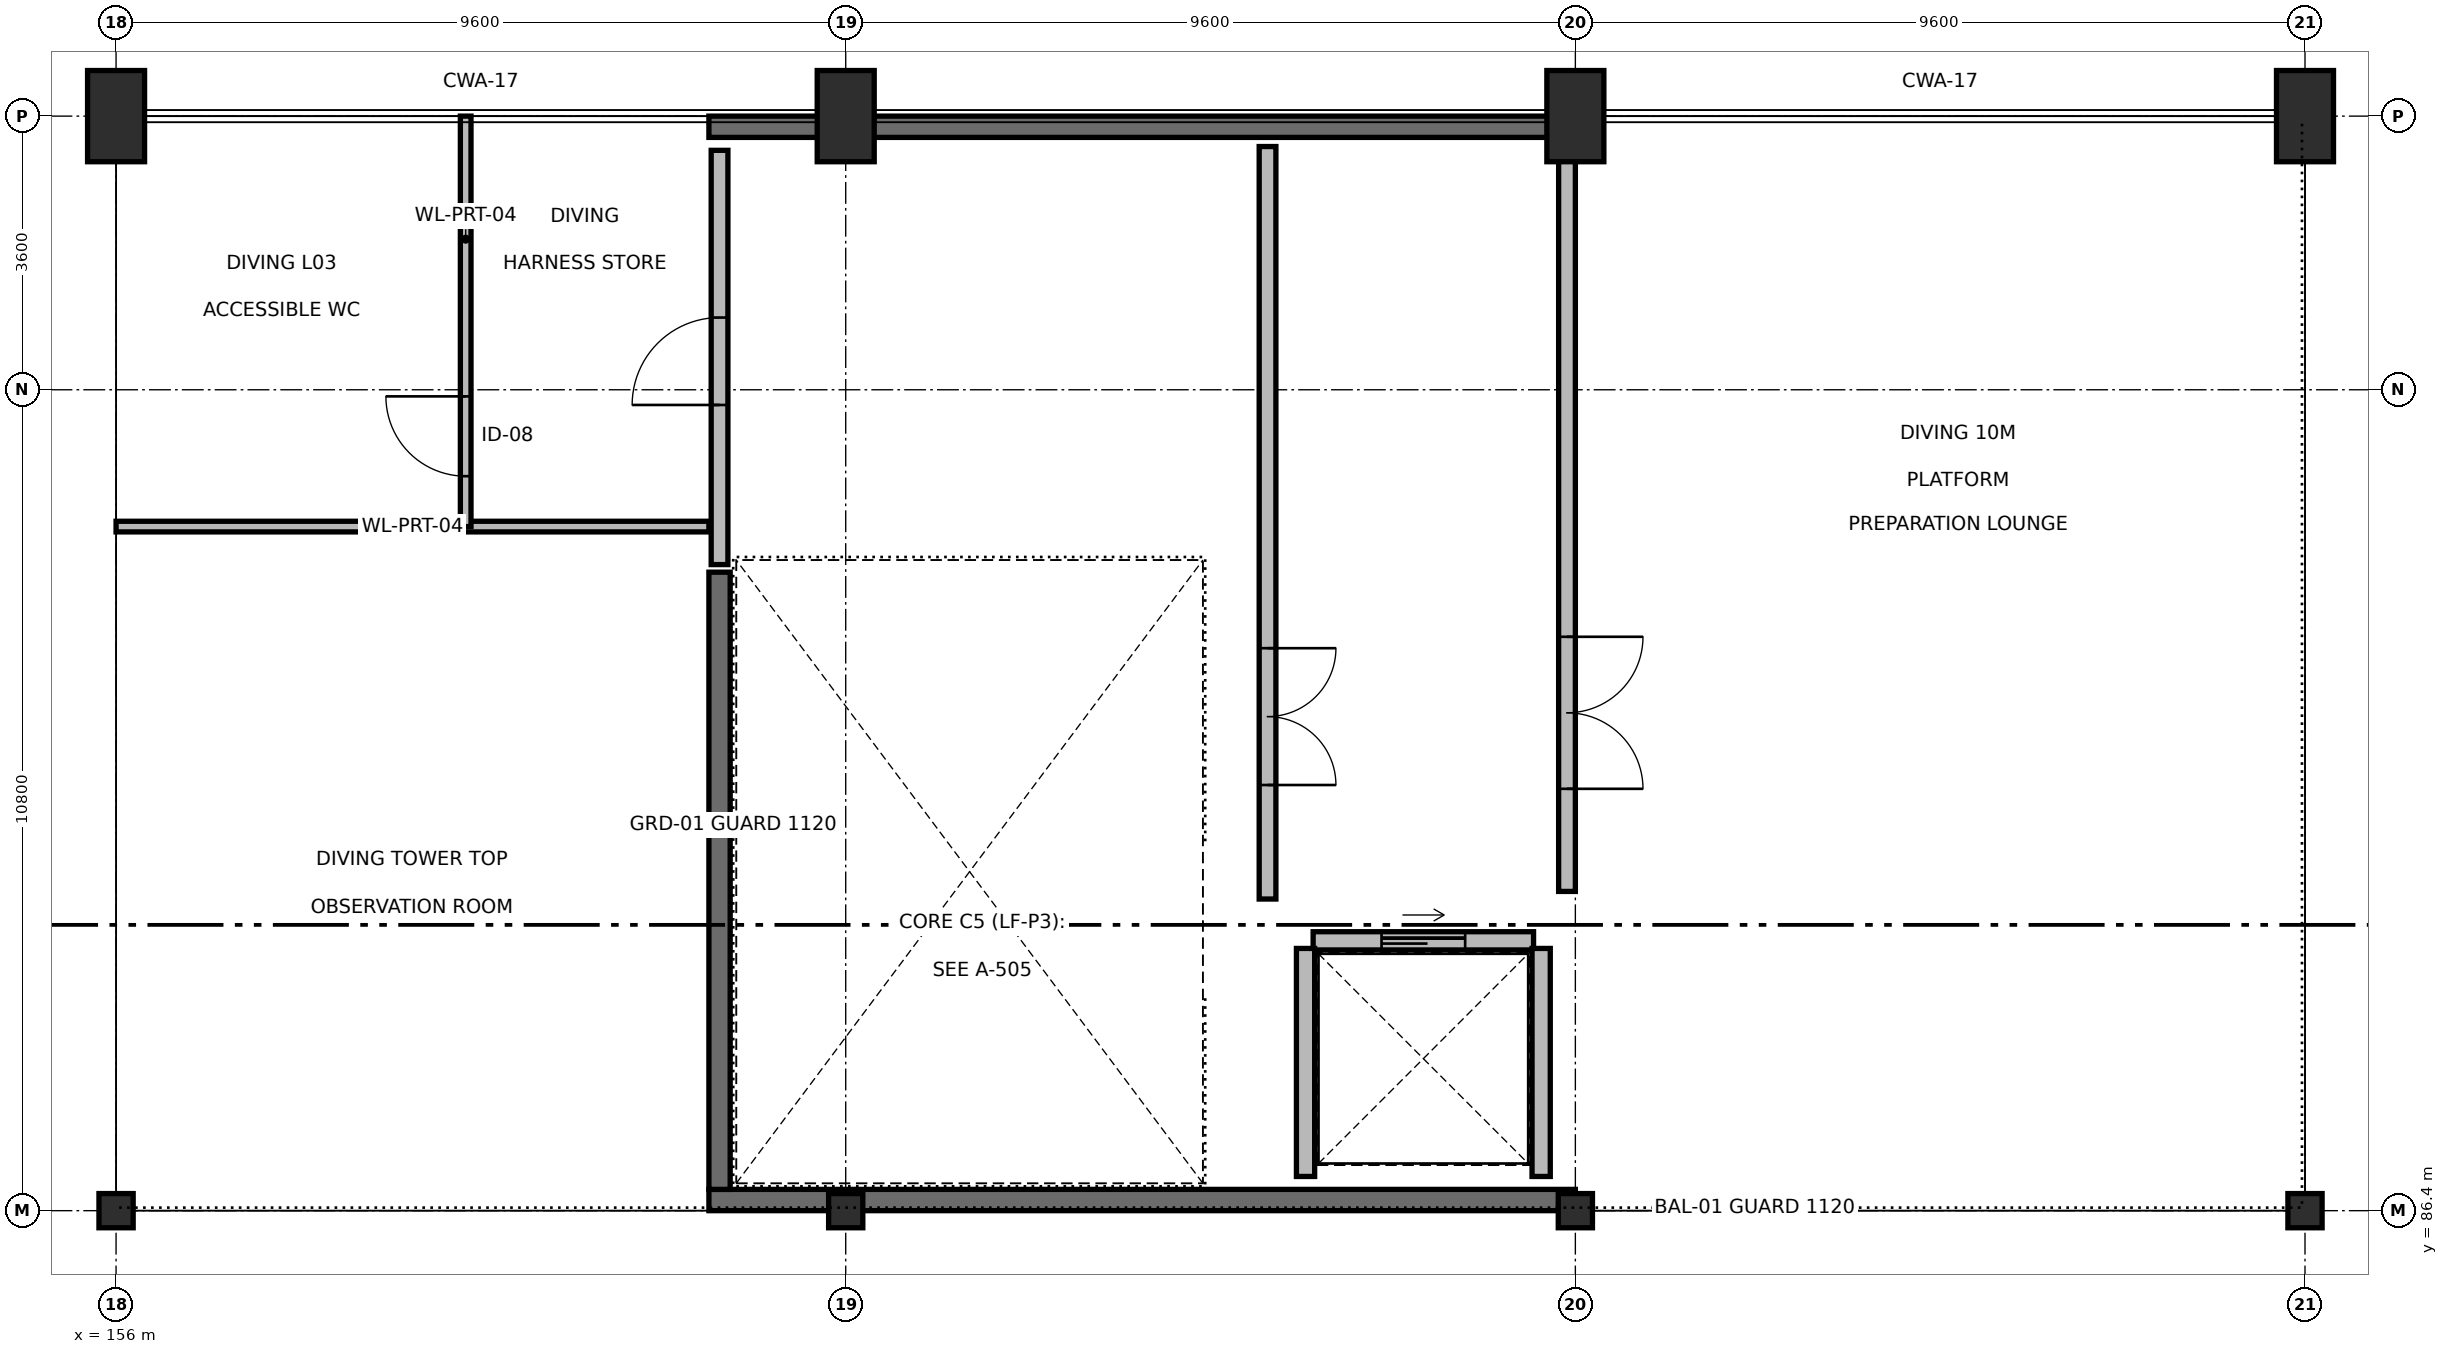
"""IFC4 building model, lengths in metres.
Left out: names, types, materials, properties, quantities, classifications, styles, units other than length and angle.
Written with IfcOpenShell. Run it as: python <this file> out.ifc"""

import sys

from ifc_helpers import new_model, si_unit, direction, frame, frame_2d, origin, origin_2d, place, context, subcontext, project, spatial, rectangle, extrude, element, fill, save


model = new_model("IFC4")
c1 = context("Model", 3, precision=1e-05, world=origin(), true_north=direction((0.0, 1.0)))
c2 = subcontext(c1, "Body", "Model", "MODEL_VIEW")
j1 = project(units=[si_unit("LENGTHUNIT", "METRE"), si_unit("PLANEANGLEUNIT", "RADIAN")], contexts=[c1])
p1 = place(None, origin())
s1 = spatial("IfcSite", under=j1, at=p1, CompositionType="ELEMENT")
p2 = place(p1, origin())
s2 = spatial("IfcBuilding", under=s1, at=p2, CompositionType="ELEMENT")
p3 = place(p2, frame((0.0, 0.0, 14.1)))
s3 = spatial("IfcBuildingStorey", under=s2, at=p3, CompositionType="ELEMENT", Elevation=14.1)
p4 = place(p3, frame((156.0, 100.8, 0.0), z_axis=(0.0, 0.0, 1.0), x_axis=(1.0, 0.0, 0.0)))
e1 = element("IfcColumn", 1, at=p4, inside=s3, PredefinedType="COLUMN", context=c2, shape_type="SweptSolid", body=[
    extrude(rectangle(XDim=0.75, YDim=1.2, at=origin_2d()), origin(), (0.0, 0.0, 1.0), 2.26),
])
p5 = place(p3, frame((165.6, 100.8, 0.0), z_axis=(0.0, 0.0, 1.0), x_axis=(1.0, 0.0, 0.0)))
e2 = element("IfcColumn", 2, at=p5, inside=s3, PredefinedType="COLUMN", context=c2, shape_type="SweptSolid", body=[
    extrude(rectangle(XDim=0.75, YDim=1.2, at=origin_2d()), origin(), (0.0, 0.0, 1.0), 2.56),
])
p6 = place(p3, frame((175.2, 100.8, 0.0), z_axis=(0.0, 0.0, 1.0), x_axis=(1.0, 0.0, 0.0)))
e3 = element("IfcColumn", 3, at=p6, inside=s3, PredefinedType="COLUMN", context=c2, shape_type="SweptSolid", body=[
    extrude(rectangle(XDim=0.75, YDim=1.2, at=origin_2d()), origin(), (0.0, 0.0, 1.0), 2.31),
])
p7 = place(p3, frame((184.8, 100.8, 0.0), z_axis=(0.0, 0.0, 1.0), x_axis=(1.0, 0.0, 0.0)))
e4 = element("IfcColumn", 4, at=p7, inside=s3, PredefinedType="COLUMN", context=c2, shape_type="SweptSolid", body=[
    extrude(rectangle(XDim=0.75, YDim=1.2, at=origin_2d()), origin(), (0.0, 0.0, 1.0), 2.56),
])
for number, where, z_axis, x_axis in (
    (5, (156.0, 86.4, 0.0), (0.0, 0.0, 1.0), (1.0, 0.0, 0.0)),
    (6, (165.6, 86.4, 0.0), (0.0, 0.0, 1.0), (1.0, 0.0, 0.0)),
    (7, (175.2, 86.4, 0.0), (0.0, 0.0, 1.0), (1.0, 0.0, 0.0)),
    (8, (184.8, 86.4, 0.0), (0.0, 0.0, 1.0), (1.0, 0.0, 0.0)),
):
    element("IfcColumn", number, at=place(p3, frame(where, z_axis=z_axis, x_axis=x_axis)), inside=s3, PredefinedType="COLUMN", context=c2, shape_type="SweptSolid", body=[
        extrude(rectangle(XDim=0.45, YDim=0.45, at=origin_2d()), origin(), (0.0, 0.0, 1.0), 1.7),
    ])
for number, where, z_axis, x_axis in (
    (9, (163.8, 86.54, 0.0), (0.0, 0.0, 1.0), (1.0, 0.0, 0.0)),
    (10, (163.8, 100.66, 0.0), (0.0, 0.0, 1.0), (1.0, 0.0, 0.0)),
):
    element("IfcWall", number, at=place(p3, frame(where, z_axis=z_axis, x_axis=x_axis)), inside=s3, PredefinedType="SHEAR", context=c2, shape_type="SweptSolid", body=[
        extrude(rectangle(XDim=11.4, YDim=0.28, at=frame_2d((5.7, 0.0))), origin(), (0.0, 0.0, 1.0), 4.5),
    ])
p8 = place(p3, frame((163.94, 86.68, 0.0), z_axis=(0.0, 0.0, 1.0), x_axis=(0.0, 1.0, 0.0)))
e11 = element("IfcWall", 11, at=p8, inside=s3, PredefinedType="SHEAR", context=c2, shape_type="SweptSolid", body=[
    extrude(rectangle(XDim=8.12, YDim=0.28, at=frame_2d((4.06, 0.0))), origin(), (0.0, 0.0, 1.0), 4.5),
])
p9 = place(p3, frame((171.15, 90.5, 0.0), z_axis=(0.0, 0.0, 1.0), x_axis=(0.0, 1.0, 0.0)))
e12 = element("IfcWall", 12, at=p9, inside=s3, PredefinedType="PARTITIONING", context=c2, shape_type="SweptSolid", body=[
    extrude(rectangle(XDim=9.9, YDim=0.22, at=frame_2d((4.95, 0.0))), origin(), (0.0, 0.0, 1.0), 4.205),
])
p10 = place(p9, frame((1.5, 0.0, 0.0)))
e13 = element("IfcOpeningElement", 13, at=p10, cuts=e12, PredefinedType="OPENING", context=c2, shape_type="SweptSolid", body=[
    extrude(rectangle(XDim=1.8, YDim=2.2, at=frame_2d((0.9, 1.1))), frame((0.0, 0.12, 0.0), z_axis=(0.0, -1.0, 0.0), x_axis=(1.0, 0.0, 0.0)), (0.0, 0.0, 1.0), 0.24),
])
p11 = place(p3, frame((171.75, 89.95, 0.0), z_axis=(0.0, 0.0, 1.0), x_axis=(1.0, 0.0, 0.0)))
e14 = element("IfcWall", 14, at=p11, inside=s3, PredefinedType="SOLIDWALL", context=c2, shape_type="SweptSolid", body=[
    extrude(rectangle(XDim=2.9, YDim=0.24, at=frame_2d((1.45, 0.0))), origin(), (0.0, 0.0, 1.0), 4.205),
])
p12 = place(p11, frame((0.9, 0.0, 0.0)))
e15 = element("IfcOpeningElement", 15, at=p12, cuts=e14, PredefinedType="OPENING", context=c2, shape_type="SweptSolid", body=[
    extrude(rectangle(XDim=1.1, YDim=2.15, at=frame_2d((0.55, 1.075))), frame((0.0, 0.13, 0.0), z_axis=(0.0, -1.0, 0.0), x_axis=(1.0, 0.0, 0.0)), (0.0, 0.0, 1.0), 0.26),
])
for number, where, z_axis, x_axis in (
    (16, (171.65, 86.85, 0.0), (0.0, 0.0, 1.0), (0.0, 1.0, 0.0)),
    (17, (174.75, 86.85, 0.0), (0.0, 0.0, 1.0), (0.0, 1.0, 0.0)),
):
    element("IfcWall", number, at=place(p3, frame(where, z_axis=z_axis, x_axis=x_axis)), inside=s3, PredefinedType="SOLIDWALL", context=c2, shape_type="SweptSolid", body=[
        extrude(rectangle(XDim=3.0, YDim=0.24, at=frame_2d((1.5, 0.0))), origin(), (0.0, 0.0, 1.0), 4.205),
    ])
p13 = place(p3, frame((175.09, 90.6, 0.0), z_axis=(0.0, 0.0, 1.0), x_axis=(0.0, 1.0, 0.0)))
e18 = element("IfcWall", 18, at=p13, inside=s3, PredefinedType="PARTITIONING", context=c2, shape_type="SweptSolid", body=[
    extrude(rectangle(XDim=9.75, YDim=0.22, at=frame_2d((4.875, 0.0))), origin(), (0.0, 0.0, 1.0), 2.432),
])
p14 = place(p13, frame((1.35, 0.0, 0.0)))
e19 = element("IfcOpeningElement", 19, at=p14, cuts=e18, PredefinedType="OPENING", context=c2, shape_type="SweptSolid", body=[
    extrude(rectangle(XDim=2.0, YDim=2.2, at=frame_2d((1.0, 1.1))), frame((0.0, 0.12, 0.0), z_axis=(0.0, -1.0, 0.0), x_axis=(1.0, 0.0, 0.0)), (0.0, 0.0, 1.0), 0.24),
])
p15 = place(p3, frame((163.94, 94.9, 0.0), z_axis=(0.0, 0.0, 1.0), x_axis=(0.0, 1.0, 0.0)))
e20 = element("IfcWall", 20, at=p15, inside=s3, PredefinedType="PARTITIONING", context=c2, shape_type="SweptSolid", body=[
    extrude(rectangle(XDim=5.45, YDim=0.22, at=frame_2d((2.725, 0.0))), origin(), (0.0, 0.0, 1.0), 4.205),
])
p16 = place(p15, frame((2.1, 0.0, 0.0)))
e21 = element("IfcOpeningElement", 21, at=p16, cuts=e20, PredefinedType="OPENING", context=c2, shape_type="SweptSolid", body=[
    extrude(rectangle(XDim=1.15, YDim=2.2, at=frame_2d((0.575, 1.1))), frame((0.0, 0.12, 0.0), z_axis=(0.0, -1.0, 0.0), x_axis=(1.0, 0.0, 0.0)), (0.0, 0.0, 1.0), 0.24),
])
p17 = place(p3, frame((156.0, 95.4, 0.0), z_axis=(0.0, 0.0, 1.0), x_axis=(1.0, 0.0, 0.0)))
e22 = element("IfcWall", 22, at=p17, inside=s3, PredefinedType="PARTITIONING", context=c2, shape_type="SweptSolid", body=[
    extrude(rectangle(XDim=7.8, YDim=0.14, at=frame_2d((3.9, 0.0))), origin(), (0.0, 0.0, 1.0), 2.987),
])
p18 = place(p3, frame((160.6, 95.4, 0.0), z_axis=(0.0, 0.0, 1.0), x_axis=(0.0, 1.0, 0.0)))
e23 = element("IfcWall", 23, at=p18, inside=s3, PredefinedType="PARTITIONING", context=c2, shape_type="SweptSolid", body=[
    extrude(rectangle(XDim=5.4, YDim=0.14, at=frame_2d((2.7, 0.0))), origin(), (0.0, 0.0, 1.0), 4.105),
])
p19 = place(p18, frame((0.663, 0.0, 0.0)))
e24 = element("IfcOpeningElement", 24, at=p19, cuts=e23, PredefinedType="OPENING", context=c2, shape_type="SweptSolid", body=[
    extrude(rectangle(XDim=1.05, YDim=2.2, at=frame_2d((0.525, 1.1))), frame((0.0, 0.08, 0.0), z_axis=(0.0, -1.0, 0.0), x_axis=(1.0, 0.0, 0.0)), (0.0, 0.0, 1.0), 0.16),
])
p20 = place(p10, origin())
e25 = element("IfcDoor", 25, at=p20, inside=s3, OperationType="DOUBLE_DOOR_SINGLE_SWING", PredefinedType="DOOR", context=c2, shape_type="SweptSolid", body=[
    extrude(rectangle(XDim=1.8, YDim=2.2, at=frame_2d((0.9, 1.1))), frame((0.0, 0.025, 0.0), z_axis=(0.0, -1.0, 0.0), x_axis=(1.0, 0.0, 0.0)), (0.0, 0.0, 1.0), 0.05),
])
fill(e13, e25)
p21 = place(p12, origin())
e26 = element("IfcDoor", 26, at=p21, inside=s3, OperationType="DOUBLE_DOOR_SLIDING", PredefinedType="DOOR", context=c2, shape_type="SweptSolid", body=[
    extrude(rectangle(XDim=1.1, YDim=2.15, at=frame_2d((0.55, 1.075))), frame((0.0, 0.025, 0.0), z_axis=(0.0, -1.0, 0.0), x_axis=(1.0, 0.0, 0.0)), (0.0, 0.0, 1.0), 0.05),
])
fill(e15, e26)
p22 = place(p14, origin())
e27 = element("IfcDoor", 27, at=p22, inside=s3, OperationType="DOUBLE_DOOR_SINGLE_SWING", PredefinedType="DOOR", context=c2, shape_type="SweptSolid", body=[
    extrude(rectangle(XDim=2.0, YDim=2.2, at=frame_2d((1.0, 1.1))), frame((0.0, 0.025, 0.0), z_axis=(0.0, -1.0, 0.0), x_axis=(1.0, 0.0, 0.0)), (0.0, 0.0, 1.0), 0.05),
])
fill(e19, e27)
p23 = place(p16, origin())
e28 = element("IfcDoor", 28, at=p23, inside=s3, OperationType="SINGLE_SWING_LEFT", PredefinedType="DOOR", context=c2, shape_type="SweptSolid", body=[
    extrude(rectangle(XDim=1.15, YDim=2.2, at=frame_2d((0.575, 1.1))), frame((0.0, 0.025, 0.0), z_axis=(0.0, -1.0, 0.0), x_axis=(1.0, 0.0, 0.0)), (0.0, 0.0, 1.0), 0.05),
])
fill(e21, e28)
p24 = place(p19, origin())
e29 = element("IfcDoor", 29, at=p24, inside=s3, OperationType="SINGLE_SWING_RIGHT", PredefinedType="DOOR", context=c2, shape_type="SweptSolid", body=[
    extrude(rectangle(XDim=1.05, YDim=2.2, at=frame_2d((0.525, 1.1))), frame((0.0, 0.025, 0.0), z_axis=(0.0, -1.0, 0.0), x_axis=(1.0, 0.0, 0.0)), (0.0, 0.0, 1.0), 0.05),
])
fill(e24, e29)
save(model, sys.argv[1])
